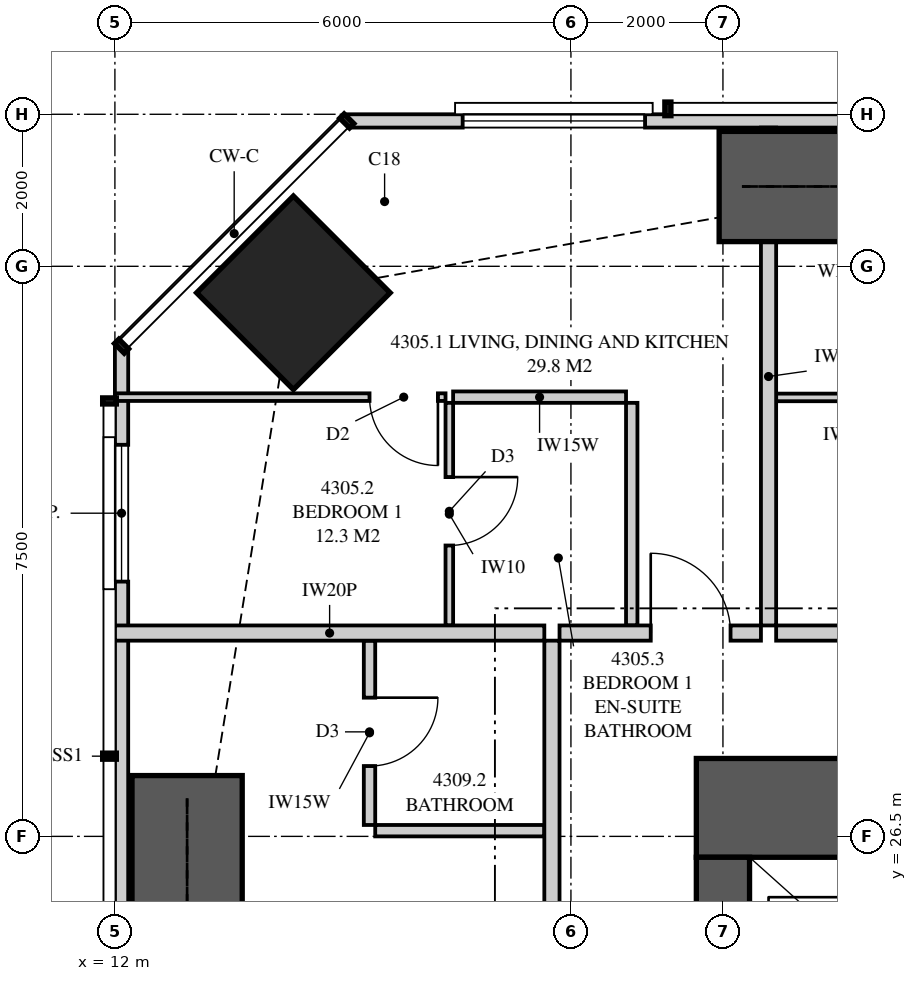
"""IFC4 building model, lengths in metres.
Left out: names, types, materials, properties, quantities, classifications, styles, units other than length and angle.
Written with IfcOpenShell. Run it as: python <this file> out.ifc"""

import sys

from ifc_helpers import new_model, si_unit, direction, frame, frame_2d, origin, origin_2d, place, context, subcontext, project, spatial, polyline, rectangle, outline, extrude, element, fill, save


model = new_model("IFC4")
c1 = context("Model", 3, precision=1e-05, world=origin(), true_north=direction((0.0, 1.0)))
c2 = subcontext(c1, "Body", "Model", "MODEL_VIEW")
j1 = project(units=[si_unit("LENGTHUNIT", "METRE"), si_unit("PLANEANGLEUNIT", "RADIAN")], contexts=[c1])
p1 = place(None, origin())
s1 = spatial("IfcSite", under=j1, at=p1, CompositionType="ELEMENT")
p2 = place(p1, origin())
s2 = spatial("IfcBuilding", under=s1, at=p2, CompositionType="ELEMENT")
p3 = place(p2, frame((0.0, 0.0, 161.05)))
s3 = spatial("IfcBuildingStorey", under=s2, at=p3, CompositionType="ELEMENT", Elevation=161.05)
p4 = place(p3, frame((14.348, 33.652, 0.0), z_axis=(0.0, 0.0, 1.0), x_axis=(0.707106781187, 0.707106781187, 0.0)))
e1 = element("IfcColumn", 1, at=p4, inside=s3, PredefinedType="COLUMN", context=c2, shape_type="SweptSolid", body=[
    extrude(rectangle(XDim=1.8, YDim=1.8, at=origin_2d()), origin(), (0.0, 0.0, 1.0), 3.35),
])
p5 = place(p3, frame((26.0, 26.875, 0.0), z_axis=(0.0, 0.0, 1.0), x_axis=(-1.0, 0.0, 0.0)))
e2 = element("IfcWall", 2, at=p5, inside=s3, PredefinedType="SHEAR", context=c2, shape_type="SweptSolid", body=[
    extrude(rectangle(XDim=6.35, YDim=1.3, at=frame_2d((3.175, 0.0))), origin(), (0.0, 0.0, 1.0), 3.35),
])
p6 = place(p5, frame((0.825, 0.0, 0.0)))
e3 = element("IfcOpeningElement", 3, at=p6, cuts=e2, PredefinedType="OPENING", context=c2, shape_type="SweptSolid", body=[
    extrude(rectangle(XDim=0.75, YDim=2.1, at=frame_2d((0.375, 1.05))), frame((0.0, 0.66, 0.0), z_axis=(0.0, -1.0, 0.0), x_axis=(1.0, 0.0, 0.0)), (0.0, 0.0, 1.0), 1.32),
])
p7 = place(p3, frame((20.0, 26.225, 0.0), z_axis=(0.0, 0.0, 1.0), x_axis=(0.0, -1.0, 0.0)))
e4 = element("IfcWall", 4, at=p7, inside=s3, PredefinedType="SHEAR", context=c2, shape_type="SweptSolid", body=[
    extrude(rectangle(XDim=2.925, YDim=0.7, at=frame_2d((1.462, 0.0))), origin(), (0.0, 0.0, 1.0), 3.35),
])
p8 = place(p3, frame((49.949, 35.913, 0.0), z_axis=(0.0, 0.0, 1.0), x_axis=(-1.0, 0.0, 0.0)))
e5 = element("IfcWall", 5, at=p8, inside=s3, PredefinedType="SOLIDWALL", context=c2, shape_type="SweptSolid", body=[
    extrude(outline(polyline([(0.0, 0.0), (34.897, 0.0), (34.897, 3.11), (27.91, 3.11), (27.91, 2.15), (27.836, 2.15), (27.836, 3.11), (27.699, 3.11), (27.699, 2.15), (7.199, 2.15), (7.199, 3.11), (7.062, 3.11), (7.062, 2.15), (6.987, 2.15), (6.987, 3.11), (0.0, 3.11), (0.0, 0.0)])), frame((0.0, 0.087, 0.0), z_axis=(0.0, -1.0, 0.0), x_axis=(1.0, 0.0, 0.0)), (0.0, 0.0, 1.0), 0.175),
])
p9 = place(p8, frame((2.389, 0.0, 0.4)))
e6 = element("IfcOpeningElement", 6, at=p9, cuts=e5, PredefinedType="OPENING", context=c2, shape_type="SweptSolid", body=[
    extrude(rectangle(XDim=2.4, YDim=1.7, at=frame_2d((1.2, 0.85))), frame((0.0, 0.097, 0.0), z_axis=(0.0, -1.0, 0.0), x_axis=(1.0, 0.0, 0.0)), (0.0, 0.0, 1.0), 0.195),
])
p10 = place(p8, frame((10.299, 0.0, 0.0)))
e7 = element("IfcOpeningElement", 7, at=p10, cuts=e5, PredefinedType="OPENING", context=c2, shape_type="SweptSolid", body=[
    extrude(rectangle(XDim=1.8, YDim=2.1, at=frame_2d((0.9, 1.05))), frame((0.0, 0.097, 0.0), z_axis=(0.0, -1.0, 0.0), x_axis=(1.0, 0.0, 0.0)), (0.0, 0.0, 1.0), 0.195),
])
p11 = place(p8, frame((12.649, 0.0, 0.4)))
e8 = element("IfcOpeningElement", 8, at=p11, cuts=e5, PredefinedType="OPENING", context=c2, shape_type="SweptSolid", body=[
    extrude(rectangle(XDim=2.4, YDim=1.7, at=frame_2d((1.2, 0.85))), frame((0.0, 0.097, 0.0), z_axis=(0.0, -1.0, 0.0), x_axis=(1.0, 0.0, 0.0)), (0.0, 0.0, 1.0), 0.195),
])
p12 = place(p8, frame((22.699, 0.0, 0.0)))
e9 = element("IfcOpeningElement", 9, at=p12, cuts=e5, PredefinedType="OPENING", context=c2, shape_type="SweptSolid", body=[
    extrude(rectangle(XDim=1.8, YDim=2.1, at=frame_2d((0.9, 1.05))), frame((0.0, 0.097, 0.0), z_axis=(0.0, -1.0, 0.0), x_axis=(1.0, 0.0, 0.0)), (0.0, 0.0, 1.0), 0.195),
])
p13 = place(p8, frame((19.849, 0.0, 0.4)))
e10 = element("IfcOpeningElement", 10, at=p13, cuts=e5, PredefinedType="OPENING", context=c2, shape_type="SweptSolid", body=[
    extrude(rectangle(XDim=2.4, YDim=1.7, at=frame_2d((1.2, 0.85))), frame((0.0, 0.097, 0.0), z_axis=(0.0, -1.0, 0.0), x_axis=(1.0, 0.0, 0.0)), (0.0, 0.0, 1.0), 0.195),
])
p14 = place(p8, frame((30.973, 0.0, 0.4)))
e11 = element("IfcOpeningElement", 11, at=p14, cuts=e5, PredefinedType="OPENING", context=c2, shape_type="SweptSolid", body=[
    extrude(rectangle(XDim=2.4, YDim=1.7, at=frame_2d((1.2, 0.85))), frame((0.0, 0.097, 0.0), z_axis=(0.0, -1.0, 0.0), x_axis=(1.0, 0.0, 0.0)), (0.0, 0.0, 1.0), 0.195),
])
p15 = place(p3, frame((12.087, 32.949, 0.0), z_axis=(0.0, 0.0, 1.0), x_axis=(0.0, -1.0, 0.0)))
e12 = element("IfcWall", 12, at=p15, inside=s3, PredefinedType="SOLIDWALL", context=c2, shape_type="SweptSolid", body=[
    extrude(outline(polyline([(0.0, 0.0), (29.897, 0.0), (29.897, 3.11), (20.191, 3.11), (20.191, 2.15), (20.051, 2.15), (20.051, 3.11), (19.949, 3.11), (19.949, 2.15), (7.949, 2.15), (7.949, 3.11), (7.823, 3.11), (7.823, 2.15), (7.73, 2.15), (7.73, 3.11), (0.0, 3.11), (0.0, 0.0)])), frame((0.0, 0.087, 0.0), z_axis=(0.0, -1.0, 0.0), x_axis=(1.0, 0.0, 0.0)), (0.0, 0.0, 1.0), 0.175),
])
p16 = place(p15, frame((1.297, 0.0, 0.4)))
e13 = element("IfcOpeningElement", 13, at=p16, cuts=e12, PredefinedType="OPENING", context=c2, shape_type="SweptSolid", body=[
    extrude(rectangle(XDim=1.8, YDim=1.7, at=frame_2d((0.9, 0.85))), frame((0.0, 0.097, 0.0), z_axis=(0.0, -1.0, 0.0), x_axis=(1.0, 0.0, 0.0)), (0.0, 0.0, 1.0), 0.195),
])
p17 = place(p15, frame((10.367, 0.0, 0.4)))
e14 = element("IfcOpeningElement", 14, at=p17, cuts=e12, PredefinedType="OPENING", context=c2, shape_type="SweptSolid", body=[
    extrude(rectangle(XDim=1.2, YDim=1.7, at=frame_2d((0.6, 0.85))), frame((0.0, 0.097, 0.0), z_axis=(0.0, -1.0, 0.0), x_axis=(1.0, 0.0, 0.0)), (0.0, 0.0, 1.0), 0.195),
])
p18 = place(p15, frame((15.083, 0.0, 0.4)))
e15 = element("IfcOpeningElement", 15, at=p18, cuts=e12, PredefinedType="OPENING", context=c2, shape_type="SweptSolid", body=[
    extrude(rectangle(XDim=2.4, YDim=1.7, at=frame_2d((1.2, 0.85))), frame((0.0, 0.097, 0.0), z_axis=(0.0, -1.0, 0.0), x_axis=(1.0, 0.0, 0.0)), (0.0, 0.0, 1.0), 0.195),
])
p19 = place(p15, frame((22.624, 0.0, 0.0)))
e16 = element("IfcOpeningElement", 16, at=p19, cuts=e12, PredefinedType="OPENING", context=c2, shape_type="SweptSolid", body=[
    extrude(rectangle(XDim=1.8, YDim=2.1, at=frame_2d((0.9, 1.05))), frame((0.0, 0.097, 0.0), z_axis=(0.0, -1.0, 0.0), x_axis=(1.0, 0.0, 0.0)), (0.0, 0.0, 1.0), 0.195),
])
p20 = place(p15, frame((26.301, 0.0, 0.4)))
e17 = element("IfcOpeningElement", 17, at=p20, cuts=e12, PredefinedType="OPENING", context=c2, shape_type="SweptSolid", body=[
    extrude(rectangle(XDim=1.8, YDim=1.7, at=frame_2d((0.9, 0.85))), frame((0.0, 0.097, 0.0), z_axis=(0.0, -1.0, 0.0), x_axis=(1.0, 0.0, 0.0)), (0.0, 0.0, 1.0), 0.195),
])
p21 = place(p3, frame((20.6, 35.825, 0.0), z_axis=(0.0, 0.0, 1.0), x_axis=(0.0, -1.0, 0.0)))
e18 = element("IfcWall", 18, at=p21, inside=s3, PredefinedType="PARTITIONING", context=c2, shape_type="SweptSolid", body=[
    extrude(outline(polyline([(0.143, 3.11), (0.0, 3.11), (0.0, 0.0), (0.529, 0.0), (0.529, 0.165), (1.021, 0.165), (1.021, 0.0), (6.55, 0.0), (6.55, 3.11), (1.991, 3.11), (1.991, 2.15), (1.021, 2.15), (1.021, 1.985), (0.529, 1.985), (0.529, 2.15), (0.143, 2.15), (0.143, 3.11)])), frame((0.0, 0.1, 0.0), z_axis=(0.0, -1.0, 0.0), x_axis=(1.0, 0.0, 0.0)), (0.0, 0.0, 1.0), 0.2),
])
p22 = place(p3, frame((17.85, 29.175, 0.0), z_axis=(0.0, 0.0, 1.0), x_axis=(1.0, 0.0, 0.0)))
e19 = element("IfcWall", 19, at=p22, inside=s3, PredefinedType="PARTITIONING", context=c2, shape_type="SweptSolid", body=[
    extrude(rectangle(XDim=2.65, YDim=0.2, at=frame_2d((1.325, 0.0))), origin(), (0.0, 0.0, 1.0), 3.11),
])
p23 = place(p22, frame((1.2, 0.0, 0.0)))
e20 = element("IfcOpeningElement", 20, at=p23, cuts=e19, PredefinedType="OPENING", context=c2, shape_type="SweptSolid", body=[
    extrude(rectangle(XDim=1.05, YDim=2.2, at=frame_2d((0.525, 1.1))), frame((0.0, 0.11, 0.0), z_axis=(0.0, -1.0, 0.0), x_axis=(1.0, 0.0, 0.0)), (0.0, 0.0, 1.0), 0.22),
])
p24 = place(p3, frame((16.4, 32.204, 0.0), z_axis=(0.0, 0.0, 1.0), x_axis=(0.0, -1.0, 0.0)))
e21 = element("IfcWall", 21, at=p24, inside=s3, PredefinedType="PARTITIONING", context=c2, shape_type="SweptSolid", body=[
    extrude(rectangle(XDim=2.929, YDim=0.1, at=frame_2d((1.464, 0.0))), origin(), (0.0, 0.0, 1.0), 3.11),
])
p25 = place(p24, frame((0.977, 0.0, 0.0)))
e22 = element("IfcOpeningElement", 22, at=p25, cuts=e21, PredefinedType="OPENING", context=c2, shape_type="SweptSolid", body=[
    extrude(rectangle(XDim=0.9, YDim=2.1, at=frame_2d((0.45, 1.05))), frame((0.0, 0.06, 0.0), z_axis=(0.0, -1.0, 0.0), x_axis=(1.0, 0.0, 0.0)), (0.0, 0.0, 1.0), 0.12),
])
p26 = place(p3, frame((16.35, 32.279, 0.0), z_axis=(0.0, 0.0, 1.0), x_axis=(-1.0, 0.0, 0.0)))
e23 = element("IfcWall", 23, at=p26, inside=s3, PredefinedType="PARTITIONING", context=c2, shape_type="SweptSolid", body=[
    extrude(outline(polyline([(0.0, 0.0), (4.35, 0.0), (4.35, 3.11), (3.094, 3.11), (3.094, 2.15), (1.352, 2.15), (1.352, 3.11), (0.0, 3.11), (0.0, 0.0)])), frame((0.0, 0.05, 0.0), z_axis=(0.0, -1.0, 0.0), x_axis=(1.0, 0.0, 0.0)), (0.0, 0.0, 1.0), 0.1),
])
p27 = place(p26, frame((0.1, 0.0, 0.0)))
e24 = element("IfcOpeningElement", 24, at=p27, cuts=e23, PredefinedType="OPENING", context=c2, shape_type="SweptSolid", body=[
    extrude(rectangle(XDim=0.9, YDim=2.1, at=frame_2d((0.45, 1.05))), frame((0.0, 0.06, 0.0), z_axis=(0.0, -1.0, 0.0), x_axis=(1.0, 0.0, 0.0)), (0.0, 0.0, 1.0), 0.12),
])
p28 = place(p3, frame((18.725, 32.279, 0.0), z_axis=(0.0, 0.0, 1.0), x_axis=(-1.0, 0.0, 0.0)))
e25 = element("IfcWall", 25, at=p28, inside=s3, PredefinedType="PLUMBINGWALL", context=c2, shape_type="SweptSolid", body=[
    extrude(rectangle(XDim=2.275, YDim=0.15, at=frame_2d((1.138, 0.0))), origin(), (0.0, 0.0, 1.0), 3.11),
])
p29 = place(p3, frame((18.8, 32.204, 0.0), z_axis=(0.0, 0.0, 1.0), x_axis=(0.0, -1.0, 0.0)))
e26 = element("IfcWall", 26, at=p29, inside=s3, PredefinedType="PLUMBINGWALL", context=c2, shape_type="SweptSolid", body=[
    extrude(rectangle(XDim=2.929, YDim=0.15, at=frame_2d((1.464, 0.0))), origin(), (0.0, 0.0, 1.0), 3.11),
])
p30 = place(p3, frame((20.7, 29.175, 0.0), z_axis=(0.0, 0.0, 1.0), x_axis=(1.0, 0.0, 0.0)))
e27 = element("IfcWall", 27, at=p30, inside=s3, PredefinedType="PARTITIONING", context=c2, shape_type="SweptSolid", body=[
    extrude(outline(polyline([(0.0, 0.0), (5.3, 0.0), (5.3, 3.11), (1.887, 3.11), (1.887, 2.541), (1.213, 2.541), (1.213, 3.11), (0.0, 3.11), (0.0, 0.0)])), frame((0.0, 0.1, 0.0), z_axis=(0.0, -1.0, 0.0), x_axis=(1.0, 0.0, 0.0)), (0.0, 0.0, 1.0), 0.2),
])
p31 = place(p3, frame((20.7, 32.275, 0.0), z_axis=(0.0, 0.0, 1.0), x_axis=(1.0, 0.0, 0.0)))
e28 = element("IfcWall", 28, at=p31, inside=s3, PredefinedType="PARTITIONING", context=c2, shape_type="SweptSolid", body=[
    extrude(outline(polyline([(0.0, 0.0), (3.55, 0.0), (3.55, 3.11), (1.837, 3.11), (1.837, 2.541), (1.263, 2.541), (1.263, 3.11), (0.0, 3.11), (0.0, 0.0)])), frame((0.0, 0.05, 0.0), z_axis=(0.0, -1.0, 0.0), x_axis=(1.0, 0.0, 0.0)), (0.0, 0.0, 1.0), 0.1),
])
p32 = place(p31, frame((1.35, 0.0, 0.0)))
e29 = element("IfcOpeningElement", 29, at=p32, cuts=e28, PredefinedType="OPENING", context=c2, shape_type="SweptSolid", body=[
    extrude(rectangle(XDim=0.9, YDim=2.1, at=frame_2d((0.45, 1.05))), frame((0.0, 0.06, 0.0), z_axis=(0.0, -1.0, 0.0), x_axis=(1.0, 0.0, 0.0)), (0.0, 0.0, 1.0), 0.12),
])
p33 = place(p3, frame((12.0, 29.175, 0.0), z_axis=(0.0, 0.0, 1.0), x_axis=(1.0, 0.0, 0.0)))
e30 = element("IfcWall", 30, at=p33, inside=s3, PredefinedType="PARTITIONING", context=c2, shape_type="SweptSolid", body=[
    extrude(outline(polyline([(0.0, 0.0), (5.65, 0.0), (5.65, 3.11), (2.547, 3.11), (2.547, 2.15), (0.703, 2.15), (0.703, 3.11), (0.0, 3.11), (0.0, 0.0)])), frame((0.0, 0.1, 0.0), z_axis=(0.0, -1.0, 0.0), x_axis=(1.0, 0.0, 0.0)), (0.0, 0.0, 1.0), 0.2),
])
p34 = place(p3, frame((15.35, 26.65, 0.0), z_axis=(0.0, 0.0, 1.0), x_axis=(0.0, 1.0, 0.0)))
e31 = element("IfcWall", 31, at=p34, inside=s3, PredefinedType="PLUMBINGWALL", context=c2, shape_type="SweptSolid", body=[
    extrude(rectangle(XDim=2.425, YDim=0.15, at=frame_2d((1.212, 0.0))), origin(), (0.0, 0.0, 1.0), 3.11),
])
p35 = place(p34, frame((0.775, 0.0, 0.0)))
e32 = element("IfcOpeningElement", 32, at=p35, cuts=e31, PredefinedType="OPENING", context=c2, shape_type="SweptSolid", body=[
    extrude(rectangle(XDim=0.9, YDim=2.1, at=frame_2d((0.45, 1.05))), frame((0.0, 0.085, 0.0), z_axis=(0.0, -1.0, 0.0), x_axis=(1.0, 0.0, 0.0)), (0.0, 0.0, 1.0), 0.17),
])
p36 = place(p3, frame((15.425, 26.575, 0.0), z_axis=(0.0, 0.0, 1.0), x_axis=(1.0, 0.0, 0.0)))
e33 = element("IfcWall", 33, at=p36, inside=s3, PredefinedType="PLUMBINGWALL", context=c2, shape_type="SweptSolid", body=[
    extrude(rectangle(XDim=2.225, YDim=0.15, at=frame_2d((1.112, 0.0))), origin(), (0.0, 0.0, 1.0), 3.11),
])
p37 = place(p3, frame((17.75, 24.6, 0.0), z_axis=(0.0, 0.0, 1.0), x_axis=(0.0, 1.0, 0.0)))
e34 = element("IfcWall", 34, at=p37, inside=s3, PredefinedType="PARTITIONING", context=c2, shape_type="SweptSolid", body=[
    extrude(outline(polyline([(0.0, 0.0), (4.475, 0.0), (4.475, 3.11), (0.737, 3.11), (0.737, 2.541), (0.062, 2.541), (0.062, 3.11), (0.0, 3.11), (0.0, 0.0)])), frame((0.0, 0.1, 0.0), z_axis=(0.0, -1.0, 0.0), x_axis=(1.0, 0.0, 0.0)), (0.0, 0.0, 1.0), 0.2),
])
for number, where, z_axis, x_axis in (
    (35, (19.95, 35.05, 0.0), (0.0, 0.0, 1.0), (1.0, 0.0, 0.0)),
    (36, (12.95, 22.7, 0.0), (0.0, 0.0, 1.0), (0.0, 1.0, 0.0)),
):
    element("IfcWall", number, at=place(p3, frame(where, z_axis=z_axis, x_axis=x_axis)), inside=s3, PredefinedType="SHEAR", context=c2, shape_type="SweptSolid", body=[
        extrude(rectangle(XDim=4.6, YDim=1.45, at=frame_2d((2.3, 0.0))), origin(), (0.0, 0.0, 1.0), 3.35),
    ])
p38 = place(p14, origin())
e37 = element("IfcWindow", 37, at=p38, inside=s3, PartitioningType="SINGLE_PANEL", PredefinedType="WINDOW", context=c2, shape_type="SweptSolid", body=[
    extrude(rectangle(XDim=2.4, YDim=1.7, at=frame_2d((1.2, 0.85))), frame((0.0, 0.03, 0.0), z_axis=(0.0, -1.0, 0.0), x_axis=(1.0, 0.0, 0.0)), (0.0, 0.0, 1.0), 0.06),
])
fill(e11, e37)
p39 = place(p16, origin())
e38 = element("IfcWindow", 38, at=p39, inside=s3, PartitioningType="SINGLE_PANEL", PredefinedType="WINDOW", context=c2, shape_type="SweptSolid", body=[
    extrude(rectangle(XDim=1.8, YDim=1.7, at=frame_2d((0.9, 0.85))), frame((0.0, 0.03, 0.0), z_axis=(0.0, -1.0, 0.0), x_axis=(1.0, 0.0, 0.0)), (0.0, 0.0, 1.0), 0.06),
])
fill(e13, e38)
p40 = place(p23, origin())
e39 = element("IfcDoor", 39, at=p40, inside=s3, OperationType="SINGLE_SWING_LEFT", PredefinedType="DOOR", context=c2, shape_type="SweptSolid", body=[
    extrude(rectangle(XDim=1.05, YDim=2.2, at=frame_2d((0.525, 1.1))), frame((0.0, 0.025, 0.0), z_axis=(0.0, -1.0, 0.0), x_axis=(1.0, 0.0, 0.0)), (0.0, 0.0, 1.0), 0.05),
])
fill(e20, e39)
p41 = place(p27, origin())
e40 = element("IfcDoor", 40, at=p41, inside=s3, OperationType="SINGLE_SWING_LEFT", PredefinedType="DOOR", context=c2, shape_type="SweptSolid", body=[
    extrude(rectangle(XDim=0.9, YDim=2.1, at=frame_2d((0.45, 1.05))), frame((0.0, 0.025, 0.0), z_axis=(0.0, -1.0, 0.0), x_axis=(1.0, 0.0, 0.0)), (0.0, 0.0, 1.0), 0.05),
])
fill(e24, e40)
p42 = place(p25, origin())
e41 = element("IfcDoor", 41, at=p42, inside=s3, OperationType="SINGLE_SWING_LEFT", PredefinedType="DOOR", context=c2, shape_type="SweptSolid", body=[
    extrude(rectangle(XDim=0.9, YDim=2.1, at=frame_2d((0.45, 1.05))), frame((0.0, 0.025, 0.0), z_axis=(0.0, -1.0, 0.0), x_axis=(1.0, 0.0, 0.0)), (0.0, 0.0, 1.0), 0.05),
])
fill(e22, e41)
p43 = place(p35, frame((0.9, 0.0, 0.0), z_axis=(0.0, 0.0, 1.0), x_axis=(-1.0, 0.0, 0.0)))
e42 = element("IfcDoor", 42, at=p43, inside=s3, OperationType="SINGLE_SWING_LEFT", PredefinedType="DOOR", context=c2, shape_type="SweptSolid", body=[
    extrude(rectangle(XDim=0.9, YDim=2.1, at=frame_2d((0.45, 1.05))), frame((0.0, 0.025, 0.0), z_axis=(0.0, -1.0, 0.0), x_axis=(1.0, 0.0, 0.0)), (0.0, 0.0, 1.0), 0.05),
])
fill(e32, e42)
save(model, sys.argv[1])
